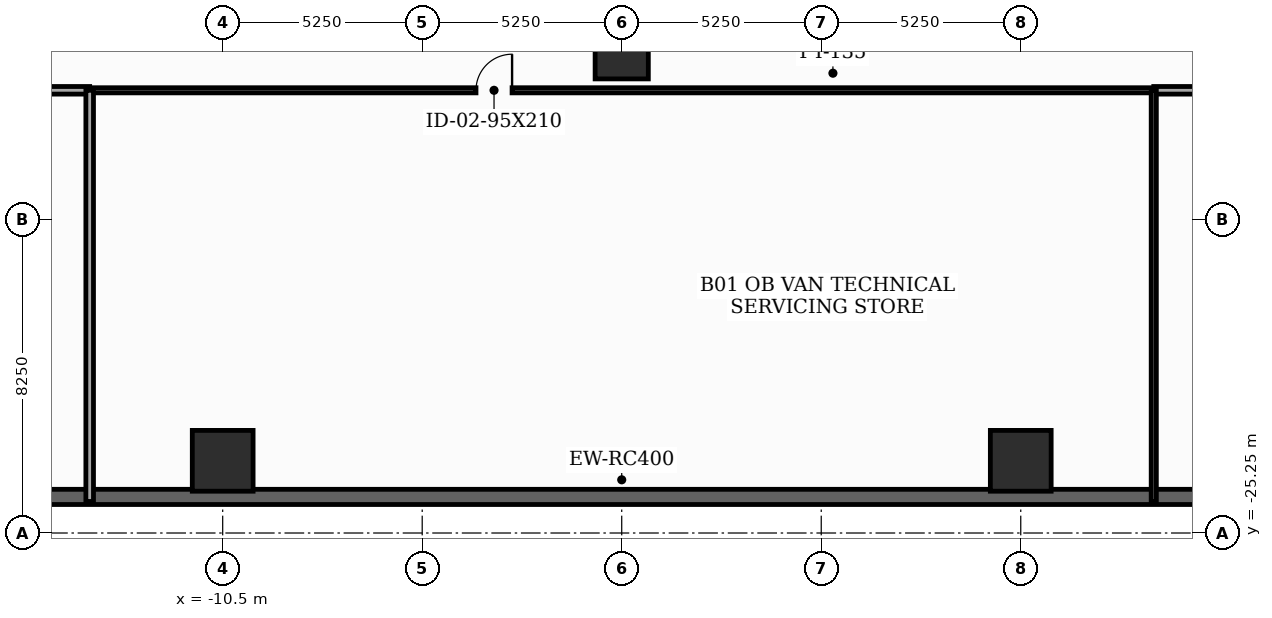
"""IFC4 building model, lengths in metres.
Left out: names, types, materials, properties, quantities, classifications, styles, units other than length and angle.
Written with IfcOpenShell. Run it as: python <this file> out.ifc"""

import sys

from ifc_helpers import new_model, si_unit, direction, frame, frame_2d, origin, origin_2d, place, context, subcontext, project, spatial, rectangle, extrude, element, fill, save


model = new_model("IFC4")
c1 = context("Model", 3, precision=1e-05, world=origin(), true_north=direction((0.0, 1.0)))
c2 = subcontext(c1, "Body", "Model", "MODEL_VIEW")
j1 = project(units=[si_unit("LENGTHUNIT", "METRE"), si_unit("PLANEANGLEUNIT", "RADIAN")], contexts=[c1])
p1 = place(None, origin())
s1 = spatial("IfcSite", under=j1, at=p1, CompositionType="ELEMENT")
p2 = place(p1, origin())
s2 = spatial("IfcBuilding", under=s1, at=p2, CompositionType="ELEMENT")
p3 = place(p2, frame((0.0, 0.0, -4.8)))
s3 = spatial("IfcBuildingStorey", under=s2, at=p3, CompositionType="ELEMENT", Elevation=-4.8)
p4 = place(p3, frame((0.0, -12.6, 0.0), z_axis=(0.0, 0.0, 1.0), x_axis=(1.0, 0.0, 0.0)))
e1 = element("IfcColumn", 1, at=p4, inside=s3, PredefinedType="COLUMN", context=c2, shape_type="SweptSolid", body=[
    extrude(rectangle(XDim=1.4, YDim=1.4, at=origin_2d()), origin(), (0.0, 0.0, 1.0), 4.8),
])
for number, where, z_axis, x_axis in (
    (2, (-10.5, -23.35, 0.0), (0.0, 0.0, 1.0), (1.0, 0.0, 0.0)),
    (3, (10.5, -23.35, 0.0), (0.0, 0.0, 1.0), (1.0, 0.0, 0.0)),
):
    element("IfcColumn", number, at=place(p3, frame(where, z_axis=z_axis, x_axis=x_axis)), inside=s3, PredefinedType="COLUMN", context=c2, shape_type="SweptSolid", body=[
        extrude(rectangle(XDim=1.6, YDim=1.6, at=origin_2d()), origin(), (0.0, 0.0, 1.0), 4.8),
    ])
p5 = place(p3, frame((-32.0, -24.3, 0.0), z_axis=(0.0, 0.0, 1.0), x_axis=(1.0, 0.0, 0.0)))
e4 = element("IfcWall", 4, at=p5, inside=s3, PredefinedType="USERDEFINED", context=c2, shape_type="SweptSolid", body=[
    extrude(rectangle(XDim=64.0, YDim=0.4, at=frame_2d((32.0, 0.0))), origin(), (0.0, 0.0, 1.0), 4.55),
])
p6 = place(p3, frame((-30.5, -13.6, 0.0), z_axis=(0.0, 0.0, 1.0), x_axis=(1.0, 0.0, 0.0)))
e5 = element("IfcWall", 5, at=p6, inside=s3, PredefinedType="SOLIDWALL", context=c2, shape_type="SweptSolid", body=[
    extrude(rectangle(XDim=16.5, YDim=0.2, at=frame_2d((8.25, 0.0))), origin(), (0.0, 0.0, 1.0), 3.335),
])
p7 = place(p6, frame((7.775, 0.0, 0.0)))
e6 = element("IfcOpeningElement", 6, at=p7, cuts=e5, PredefinedType="OPENING", context=c2, shape_type="SweptSolid", body=[
    extrude(rectangle(XDim=0.95, YDim=2.1, at=frame_2d((0.475, 1.05))), frame((0.0, 0.11, 0.0), z_axis=(0.0, -1.0, 0.0), x_axis=(1.0, 0.0, 0.0)), (0.0, 0.0, 1.0), 0.22),
])
p8 = place(p3, frame((-14.0, -13.6, 0.0), z_axis=(0.0, 0.0, 1.0), x_axis=(1.0, 0.0, 0.0)))
e7 = element("IfcWall", 7, at=p8, inside=s3, PredefinedType="PARTITIONING", context=c2, shape_type="SweptSolid", body=[
    extrude(rectangle(XDim=28.0, YDim=0.135, at=frame_2d((14.0, 0.0))), origin(), (0.0, 0.0, 1.0), 3.335),
])
p9 = place(p8, frame((10.165, 0.0, 0.0)))
e8 = element("IfcOpeningElement", 8, at=p9, cuts=e7, PredefinedType="OPENING", context=c2, shape_type="SweptSolid", body=[
    extrude(rectangle(XDim=0.95, YDim=2.1, at=frame_2d((0.475, 1.05))), frame((0.0, 0.077, 0.0), z_axis=(0.0, -1.0, 0.0), x_axis=(1.0, 0.0, 0.0)), (0.0, 0.0, 1.0), 0.155),
])
p10 = place(p3, frame((14.0, -13.6, 0.0), z_axis=(0.0, 0.0, 1.0), x_axis=(1.0, 0.0, 0.0)))
e9 = element("IfcWall", 9, at=p10, inside=s3, PredefinedType="SOLIDWALL", context=c2, shape_type="SweptSolid", body=[
    extrude(rectangle(XDim=16.5, YDim=0.2, at=frame_2d((8.25, 0.0))), origin(), (0.0, 0.0, 1.0), 3.335),
])
p11 = place(p10, frame((7.775, 0.0, 0.0)))
e10 = element("IfcOpeningElement", 10, at=p11, cuts=e9, PredefinedType="OPENING", context=c2, shape_type="SweptSolid", body=[
    extrude(rectangle(XDim=0.95, YDim=2.1, at=frame_2d((0.475, 1.05))), frame((0.0, 0.11, 0.0), z_axis=(0.0, -1.0, 0.0), x_axis=(1.0, 0.0, 0.0)), (0.0, 0.0, 1.0), 0.22),
])
p12 = place(p3, frame((-14.0, -24.42, 0.0), z_axis=(0.0, 0.0, 1.0), x_axis=(0.0, 1.0, 0.0)))
e11 = element("IfcWall", 11, at=p12, inside=s3, PredefinedType="SOLIDWALL", context=c2, shape_type="SweptSolid", body=[
    extrude(rectangle(XDim=10.82, YDim=0.2, at=frame_2d((5.41, 0.0))), origin(), (0.0, 0.0, 1.0), 3.335),
])
p13 = place(p3, frame((14.0, -24.42, 0.0), z_axis=(0.0, 0.0, 1.0), x_axis=(0.0, 1.0, 0.0)))
e12 = element("IfcWall", 12, at=p13, inside=s3, PredefinedType="PARTITIONING", context=c2, shape_type="SweptSolid", body=[
    extrude(rectangle(XDim=10.82, YDim=0.135, at=frame_2d((5.41, 0.0))), origin(), (0.0, 0.0, 1.0), 3.335),
])
p14 = place(p9, origin())
e13 = element("IfcDoor", 13, at=p14, inside=s3, OperationType="SINGLE_SWING_RIGHT", PredefinedType="DOOR", context=c2, shape_type="SweptSolid", body=[
    extrude(rectangle(XDim=0.95, YDim=2.1, at=frame_2d((0.475, 1.05))), frame((0.0, 0.025, 0.0), z_axis=(0.0, -1.0, 0.0), x_axis=(1.0, 0.0, 0.0)), (0.0, 0.0, 1.0), 0.05),
])
fill(e8, e13)
save(model, sys.argv[1])
